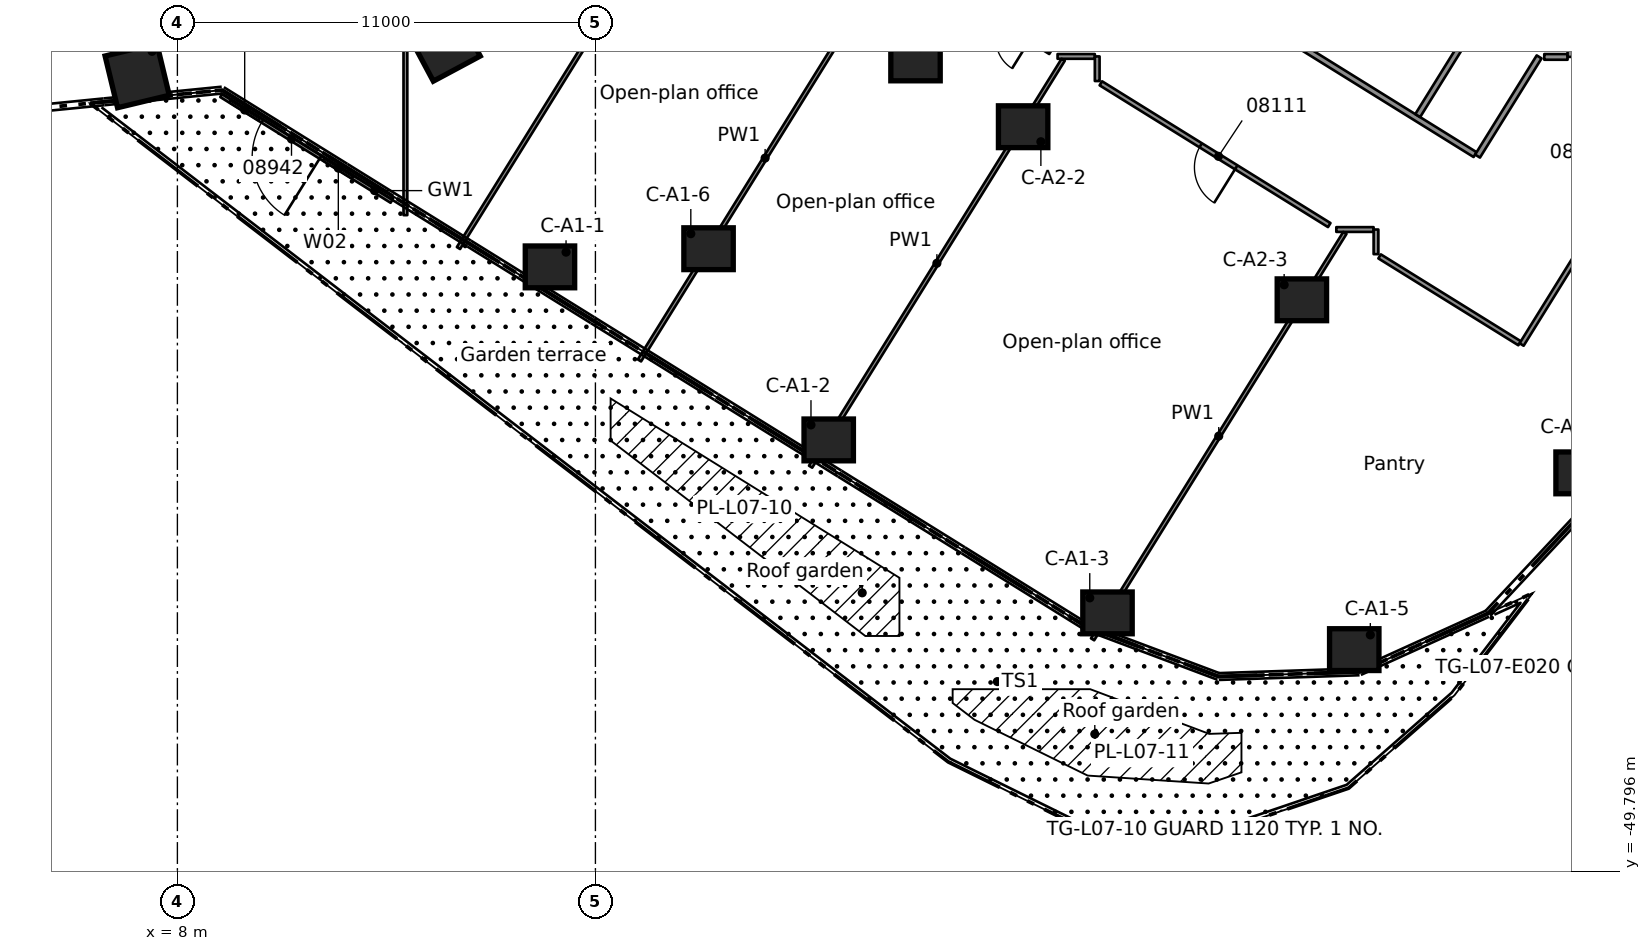
"""IFC4 building model, lengths in metres.
Left out: names, types, materials, properties, quantities, classifications, styles, units other than length and angle.
Written with IfcOpenShell. Run it as: python <this file> out.ifc"""

import sys

from ifc_helpers import new_model, si_unit, direction, frame, frame_2d, origin, origin_2d, place, context, subcontext, project, spatial, rectangle, extrude, element, fill, save


model = new_model("IFC4")
c1 = context("Model", 3, precision=1e-05, world=origin(), true_north=direction((0.0, 1.0)))
c2 = subcontext(c1, "Body", "Model", "MODEL_VIEW")
j1 = project(units=[si_unit("LENGTHUNIT", "METRE"), si_unit("PLANEANGLEUNIT", "RADIAN")], contexts=[c1])
p1 = place(None, origin())
s1 = spatial("IfcSite", under=j1, at=p1, CompositionType="ELEMENT")
p2 = place(p1, origin())
s2 = spatial("IfcBuilding", under=s1, at=p2, CompositionType="ELEMENT")
p3 = place(p2, frame((0.0, 0.0, 37.3)))
s3 = spatial("IfcBuildingStorey", under=s2, at=p3, CompositionType="ELEMENT", Elevation=37.3)
for number, where, z_axis, x_axis in (
    (1, (17.804, -33.888, 0.0), (0.0, 0.0, 1.0), (1.0, 0.0, 0.0)),
    (2, (25.139, -38.441, 0.0), (0.0, 0.0, 1.0), (1.0, 0.0, 0.0)),
    (3, (32.475, -42.992, 0.0), (0.0, 0.0, 1.0), (1.0, 0.0, 0.0)),
    (4, (38.968, -43.959, 0.0), (0.0, 0.0, 1.0), (1.0, 0.0, 0.0)),
    (5, (21.977, -33.41, 0.0), (0.0, 0.0, 1.0), (1.0, 0.0, 0.0)),
    (6, (30.255, -30.2, 0.0), (0.0, 0.0, 1.0), (1.0, 0.0, 0.0)),
    (7, (37.59, -34.754, 0.0), (0.0, 0.0, 1.0), (1.0, 0.0, 0.0)),
    (8, (44.924, -39.308, 0.0), (0.0, 0.0, 1.0), (1.0, 0.0, 0.0)),
    (9, (27.423, -28.442, 0.0), (0.0, 0.0, 1.0), (1.0, 0.0, 0.0)),
):
    element("IfcColumn", number, at=place(p3, frame(where, z_axis=z_axis, x_axis=x_axis)), inside=s3, PredefinedType="COLUMN", context=c2, shape_type="SweptSolid", body=[
        extrude(rectangle(XDim=1.3, YDim=1.1, at=origin_2d()), origin(), (0.0, 0.0, 1.0), 3.5),
    ])
for number, where, z_axis, x_axis in (
    (10, (15.021, -28.054, 0.0), (0.0, 0.0, 1.0), (0.472, -0.882, 0.0)),
    (11, (6.942, -28.856, 0.0), (0.0, 0.0, 1.0), (0.234, -0.972, 0.0)),
):
    element("IfcColumn", number, at=place(p3, frame(where, z_axis=z_axis, x_axis=x_axis)), inside=s3, PredefinedType="COLUMN", context=c2, shape_type="SweptSolid", body=[
        extrude(rectangle(XDim=1.4, YDim=1.4, at=origin_2d()), origin(), (0.0, 0.0, 1.0), 3.5),
    ])
p4 = place(p3, frame((13.636, -32.16, 0.0), z_axis=(0.0, 0.0, 1.0), x_axis=(-0.849575099281, 0.527467677381, 0.0)))
e12 = element("IfcWall", 12, at=p4, inside=s3, PredefinedType="STANDARD", context=c2, shape_type="SweptSolid", body=[
    extrude(rectangle(XDim=5.276, YDim=0.1, at=frame_2d((2.638, 0.0))), origin(), (0.0, 0.0, 1.0), 3.08),
])
p5 = place(p4, frame((2.2, 0.0, 0.0)))
e13 = element("IfcOpeningElement", 13, at=p5, cuts=e12, PredefinedType="OPENING", context=c2, shape_type="SweptSolid", body=[
    extrude(rectangle(XDim=1.8, YDim=2.4, at=frame_2d((0.9, 1.2))), frame((0.0, 0.06, 0.0), z_axis=(0.0, -1.0, 0.0), x_axis=(1.0, 0.0, 0.0)), (0.0, 0.0, 1.0), 0.12),
])
p6 = place(p4, frame((1.2, 0.0, 0.0)))
e14 = element("IfcOpeningElement", 14, at=p6, cuts=e12, PredefinedType="OPENING", context=c2, shape_type="SweptSolid", body=[
    extrude(rectangle(XDim=0.9, YDim=2.4, at=frame_2d((0.45, 1.2))), frame((0.0, 0.06, 0.0), z_axis=(0.0, -1.0, 0.0), x_axis=(1.0, 0.0, 0.0)), (0.0, 0.0, 1.0), 0.12),
])
p7 = place(p4, frame((4.1, 0.0, 0.0)))
e15 = element("IfcOpeningElement", 15, at=p7, cuts=e12, PredefinedType="OPENING", context=c2, shape_type="SweptSolid", body=[
    extrude(rectangle(XDim=0.9, YDim=2.4, at=frame_2d((0.45, 1.2))), frame((0.0, 0.06, 0.0), z_axis=(0.0, -1.0, 0.0), x_axis=(1.0, 0.0, 0.0)), (0.0, 0.0, 1.0), 0.12),
])
p8 = place(p3, frame((30.975, -28.234, 0.0), z_axis=(0.0, 0.0, 1.0), x_axis=(-0.850042036272, 0.52671485319, 0.0)))
e16 = element("IfcWall", 16, at=p8, inside=s3, PredefinedType="PARTITIONING", context=c2, shape_type="SweptSolid", body=[
    extrude(rectangle(XDim=1.773, YDim=0.125, at=frame_2d((0.886, 0.0))), origin(), (0.0, 0.0, 1.0), 3.06),
])
p9 = place(p8, frame((0.631, 0.0, 0.0)))
e17 = element("IfcOpeningElement", 17, at=p9, cuts=e16, PredefinedType="OPENING", context=c2, shape_type="SweptSolid", body=[
    extrude(rectangle(XDim=0.9, YDim=2.1, at=frame_2d((0.45, 1.05))), frame((0.0, 0.073, 0.0), z_axis=(0.0, -1.0, 0.0), x_axis=(1.0, 0.0, 0.0)), (0.0, 0.0, 1.0), 0.145),
])
p10 = place(p3, frame((38.31, -32.788, 0.0), z_axis=(0.0, 0.0, 1.0), x_axis=(-0.849663629849, 0.527325057352, 0.0)))
e18 = element("IfcWall", 18, at=p10, inside=s3, PredefinedType="PARTITIONING", context=c2, shape_type="SweptSolid", body=[
    extrude(rectangle(XDim=7.073, YDim=0.125, at=frame_2d((3.537, 0.0))), origin(), (0.0, 0.0, 1.0), 3.06),
])
p11 = place(p10, frame((2.881, 0.0, 0.0)))
e19 = element("IfcOpeningElement", 19, at=p11, cuts=e18, PredefinedType="OPENING", context=c2, shape_type="SweptSolid", body=[
    extrude(rectangle(XDim=1.1, YDim=2.1, at=frame_2d((0.55, 1.05))), frame((0.0, 0.073, 0.0), z_axis=(0.0, -1.0, 0.0), x_axis=(1.0, 0.0, 0.0)), (0.0, 0.0, 1.0), 0.145),
])
p12 = place(p3, frame((39.635, -33.612, 0.0), z_axis=(0.0, 0.0, 1.0), x_axis=(0.849721068894, -0.527232496226, 0.0)))
e20 = element("IfcWall", 20, at=p12, inside=s3, PredefinedType="PARTITIONING", context=c2, shape_type="SweptSolid", body=[
    extrude(rectangle(XDim=4.336, YDim=0.125, at=frame_2d((2.168, 0.0))), origin(), (0.0, 0.0, 1.0), 3.06),
])
p13 = place(p3, frame((29.735, -23.228, 0.0), z_axis=(0.0, 0.0, 1.0), x_axis=(0.849593173651, -0.527438564466, 0.0)))
e21 = element("IfcWall", 21, at=p13, inside=s3, PredefinedType="PARTITIONING", context=c2, shape_type="SweptSolid", body=[
    extrude(rectangle(XDim=14.61, YDim=0.15, at=frame_2d((7.305, 0.0))), origin(), (0.0, 0.0, 1.0), 3.06),
])
p14 = place(p13, frame((7.936, 0.0, 0.0)))
e22 = element("IfcOpeningElement", 22, at=p14, cuts=e21, PredefinedType="OPENING", context=c2, shape_type="SweptSolid", body=[
    extrude(rectangle(XDim=0.9, YDim=2.1, at=frame_2d((0.45, 1.05))), frame((0.0, 0.085, 0.0), z_axis=(0.0, -1.0, 0.0), x_axis=(1.0, 0.0, 0.0)), (0.0, 0.0, 1.0), 0.17),
])
p15 = place(p3, frame((38.496, -32.905, 0.0), z_axis=(0.0, 0.0, 1.0), x_axis=(1.0, 0.0, 0.0)))
e23 = element("IfcWall", 23, at=p15, inside=s3, PredefinedType="PARTITIONING", context=c2, shape_type="SweptSolid", body=[
    extrude(rectangle(XDim=0.981, YDim=0.125, at=frame_2d((0.49, 0.0))), origin(), (0.0, 0.0, 1.0), 3.06),
])
p16 = place(p3, frame((43.968, -28.363, 0.0), z_axis=(0.0, 0.0, 1.0), x_axis=(1.0, 0.0, 0.0)))
e24 = element("IfcWall", 24, at=p16, inside=s3, PredefinedType="PARTITIONING", context=c2, shape_type="SweptSolid", body=[
    extrude(rectangle(XDim=0.613, YDim=0.15, at=frame_2d((0.307, 0.0))), origin(), (0.0, 0.0, 1.0), 3.06),
])
p17 = place(p3, frame((31.161, -28.35, 0.0), z_axis=(0.0, 0.0, 1.0), x_axis=(1.0, 0.0, 0.0)))
e25 = element("IfcWall", 25, at=p17, inside=s3, PredefinedType="PARTITIONING", context=c2, shape_type="SweptSolid", body=[
    extrude(rectangle(XDim=0.981, YDim=0.125, at=frame_2d((0.491, 0.0))), origin(), (0.0, 0.0, 1.0), 3.06),
])
p18 = place(p3, frame((50.916, -23.78, 0.0), z_axis=(0.0, 0.0, 1.0), x_axis=(-0.527464838764, -0.84957686166, 0.0)))
e26 = element("IfcWall", 26, at=p18, inside=s3, PredefinedType="PARTITIONING", context=c2, shape_type="SweptSolid", body=[
    extrude(rectangle(XDim=14.302, YDim=0.125, at=frame_2d((7.151, 0.0))), origin(), (0.0, 0.0, 1.0), 3.06),
])
p19 = place(p18, frame((3.103, 0.0, 0.0)))
e27 = element("IfcOpeningElement", 27, at=p19, cuts=e26, PredefinedType="OPENING", context=c2, shape_type="SweptSolid", body=[
    extrude(rectangle(XDim=0.9, YDim=2.1, at=frame_2d((0.45, 1.05))), frame((0.0, 0.073, 0.0), z_axis=(0.0, -1.0, 0.0), x_axis=(1.0, 0.0, 0.0)), (0.0, 0.0, 1.0), 0.145),
])
p20 = place(p18, frame((10.253, 0.0, 0.0)))
e28 = element("IfcOpeningElement", 28, at=p20, cuts=e26, PredefinedType="OPENING", context=c2, shape_type="SweptSolid", body=[
    extrude(rectangle(XDim=0.9, YDim=2.1, at=frame_2d((0.45, 1.05))), frame((0.0, 0.073, 0.0), z_axis=(0.0, -1.0, 0.0), x_axis=(1.0, 0.0, 0.0)), (0.0, 0.0, 1.0), 0.145),
])
p21 = place(p3, frame((42.212, -30.973, 0.0), z_axis=(0.0, 0.0, 1.0), x_axis=(0.527639763473, 0.849468233663, 0.0)))
e29 = element("IfcWall", 29, at=p21, inside=s3, PredefinedType="PARTITIONING", context=c2, shape_type="SweptSolid", body=[
    extrude(rectangle(XDim=3.072, YDim=0.15, at=frame_2d((1.536, 0.0))), origin(), (0.0, 0.0, 1.0), 3.06),
])
p22 = place(p3, frame((32.082, -43.688, 0.0), z_axis=(0.0, 0.0, 1.0), x_axis=(0.527487900205, 0.849562543394, 0.0)))
e30 = element("IfcWall", 30, at=p22, inside=s3, PredefinedType="PARTITIONING", context=c2, shape_type="SweptSolid", body=[
    extrude(rectangle(XDim=12.588, YDim=0.1, at=frame_2d((6.294, 0.0))), origin(), (0.0, 0.0, 1.0), 3.06),
])
p23 = place(p3, frame((40.638, -29.907, 0.0), z_axis=(0.0, 0.0, 1.0), x_axis=(0.527371608889, 0.849634736895, 0.0)))
e31 = element("IfcWall", 31, at=p23, inside=s3, PredefinedType="PARTITIONING", context=c2, shape_type="SweptSolid", body=[
    extrude(rectangle(XDim=6.948, YDim=0.15, at=frame_2d((3.474, 0.0))), origin(), (0.0, 0.0, 1.0), 3.06),
])
p24 = place(p3, frame((24.662, -39.146, 0.0), z_axis=(0.0, 0.0, 1.0), x_axis=(0.527433265795, 0.849596463112, 0.0)))
e32 = element("IfcWall", 32, at=p24, inside=s3, PredefinedType="PARTITIONING", context=c2, shape_type="SweptSolid", body=[
    extrude(rectangle(XDim=12.603, YDim=0.1, at=frame_2d((6.301, 0.0))), origin(), (0.0, 0.0, 1.0), 3.06),
])
p25 = place(p3, frame((20.159, -36.35, 0.0), z_axis=(0.0, 0.0, 1.0), x_axis=(0.527477742042, 0.849568850447, 0.0)))
e33 = element("IfcWall", 33, at=p25, inside=s3, PredefinedType="PARTITIONING", context=c2, shape_type="SweptSolid", body=[
    extrude(rectangle(XDim=12.537, YDim=0.1, at=frame_2d((6.269, 0.0))), origin(), (0.0, 0.0, 1.0), 3.06),
])
p26 = place(p3, frame((15.396, -33.393, 0.0), z_axis=(0.0, 0.0, 1.0), x_axis=(0.527468891267, 0.849574345626, 0.0)))
e34 = element("IfcWall", 34, at=p26, inside=s3, PredefinedType="PARTITIONING", context=c2, shape_type="SweptSolid", body=[
    extrude(rectangle(XDim=13.813, YDim=0.1, at=frame_2d((6.906, 0.0))), origin(), (0.0, 0.0, 1.0), 3.06),
])
p27 = place(p3, frame((44.656, -28.363, 0.0), z_axis=(0.0, 0.0, 1.0), x_axis=(0.0, 1.0, 0.0)))
e35 = element("IfcWall", 35, at=p27, inside=s3, PredefinedType="PARTITIONING", context=c2, shape_type="SweptSolid", body=[
    extrude(rectangle(XDim=1.326, YDim=0.15, at=frame_2d((0.663, 0.0))), origin(), (0.0, 0.0, 1.0), 3.06),
])
for number, where, z_axis, x_axis in (
    (36, (39.54, -33.553, 0.0), (0.0, 0.0, 1.0), (0.0, 1.0, 0.0)),
    (37, (32.204, -28.998, 0.0), (0.0, 0.0, 1.0), (0.0, 1.0, 0.0)),
):
    element("IfcWall", number, at=place(p3, frame(where, z_axis=z_axis, x_axis=x_axis)), inside=s3, PredefinedType="PARTITIONING", context=c2, shape_type="SweptSolid", body=[
        extrude(rectangle(XDim=0.648, YDim=0.125, at=frame_2d((0.324, 0.0))), origin(), (0.0, 0.0, 1.0), 3.06),
    ])
p28 = place(p3, frame((14.0, -32.527, 0.0), z_axis=(0.0, 0.0, 1.0), x_axis=(0.0, 1.0, 0.0)))
e38 = element("IfcWall", 38, at=p28, inside=s3, PredefinedType="PARTITIONING", context=c2, shape_type="SweptSolid", body=[
    extrude(rectangle(XDim=18.013, YDim=0.1, at=frame_2d((9.007, 0.0))), origin(), (0.0, 0.0, 1.0), 3.06),
])
p29 = place(p5, origin())
e39 = element("IfcDoor", 39, at=p29, inside=s3, OperationType="DOUBLE_DOOR_SINGLE_SWING", PredefinedType="DOOR", context=c2, shape_type="SweptSolid", body=[
    extrude(rectangle(XDim=1.8, YDim=2.4, at=frame_2d((0.9, 1.2))), frame((0.0, 0.025, 0.0), z_axis=(0.0, -1.0, 0.0), x_axis=(1.0, 0.0, 0.0)), (0.0, 0.0, 1.0), 0.05),
])
fill(e13, e39)
p30 = place(p6, origin())
e40 = element("IfcWindow", 40, at=p30, inside=s3, PartitioningType="SINGLE_PANEL", PredefinedType="WINDOW", context=c2, shape_type="SweptSolid", body=[
    extrude(rectangle(XDim=0.9, YDim=2.4, at=frame_2d((0.45, 1.2))), frame((0.0, 0.03, 0.0), z_axis=(0.0, -1.0, 0.0), x_axis=(1.0, 0.0, 0.0)), (0.0, 0.0, 1.0), 0.06),
])
fill(e14, e40)
p31 = place(p7, origin())
e41 = element("IfcWindow", 41, at=p31, inside=s3, PartitioningType="SINGLE_PANEL", PredefinedType="WINDOW", context=c2, shape_type="SweptSolid", body=[
    extrude(rectangle(XDim=0.9, YDim=2.4, at=frame_2d((0.45, 1.2))), frame((0.0, 0.03, 0.0), z_axis=(0.0, -1.0, 0.0), x_axis=(1.0, 0.0, 0.0)), (0.0, 0.0, 1.0), 0.06),
])
fill(e15, e41)
p32 = place(p11, origin())
e42 = element("IfcDoor", 42, at=p32, inside=s3, OperationType="SINGLE_SWING_LEFT", PredefinedType="DOOR", context=c2, shape_type="SweptSolid", body=[
    extrude(rectangle(XDim=1.1, YDim=2.1, at=frame_2d((0.55, 1.05))), frame((0.0, 0.025, 0.0), z_axis=(0.0, -1.0, 0.0), x_axis=(1.0, 0.0, 0.0)), (0.0, 0.0, 1.0), 0.05),
])
fill(e19, e42)
save(model, sys.argv[1])
